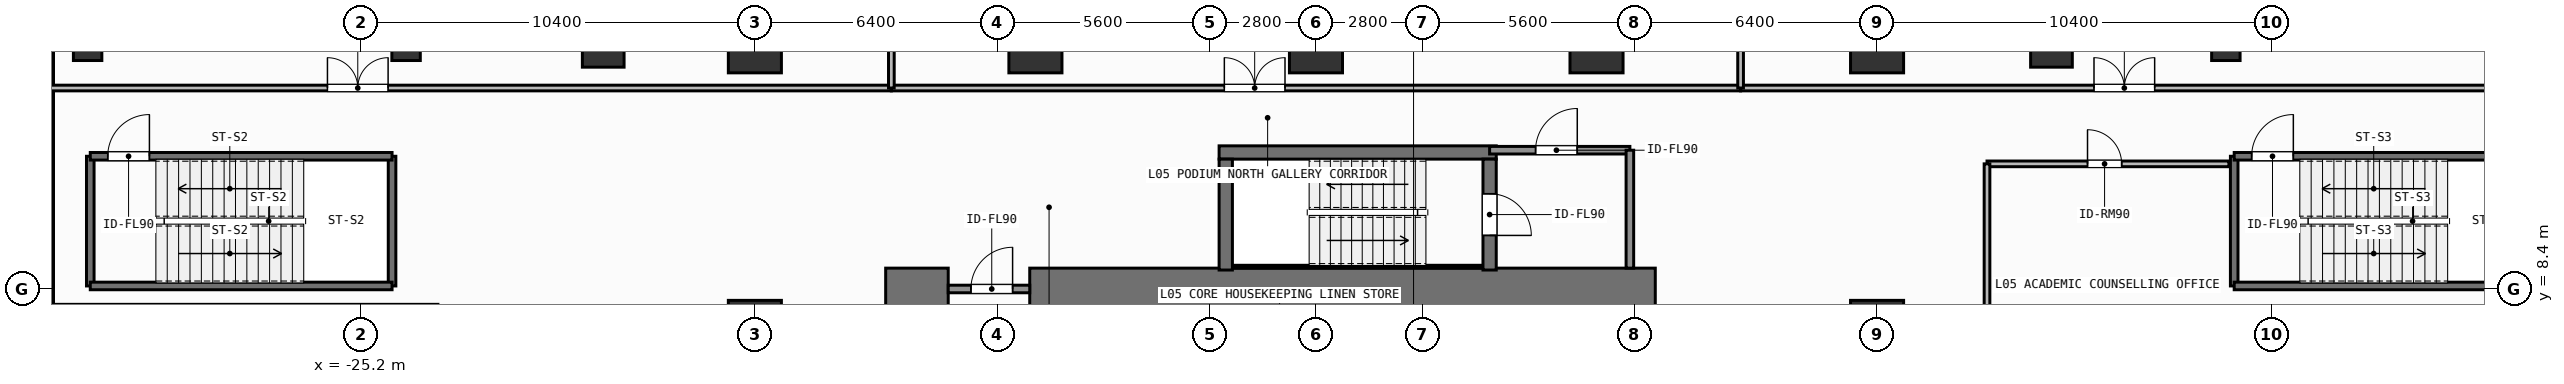
"""IFC4 building model, lengths in metres.
Left out: names, types, materials, properties, quantities, classifications, styles, units other than length and angle.
Written with IfcOpenShell. Run it as: python <this file> out.ifc"""

import sys

from ifc_helpers import new_model, si_unit, direction, frame, frame_2d, origin, origin_2d, place, context, subcontext, project, spatial, rectangle, extrude, element, fill, save


model = new_model("IFC4")
c1 = context("Model", 3, precision=1e-05, world=origin(), true_north=direction((0.0, 1.0)))
c2 = subcontext(c1, "Body", "Model", "MODEL_VIEW")
j1 = project(units=[si_unit("LENGTHUNIT", "METRE"), si_unit("PLANEANGLEUNIT", "RADIAN")], contexts=[c1])
p1 = place(None, origin())
s1 = spatial("IfcSite", under=j1, at=p1, CompositionType="ELEMENT")
p2 = place(p1, origin())
s2 = spatial("IfcBuilding", under=s1, at=p2, CompositionType="ELEMENT")
p3 = place(p2, frame((0.0, 0.0, 17.4)))
s3 = spatial("IfcBuildingStorey", under=s2, at=p3, CompositionType="ELEMENT", Elevation=17.4)
p4 = place(p3, frame((-11.35, 8.4, 0.0), z_axis=(0.0, 0.0, 1.0), x_axis=(1.0, 0.0, 0.0)))
e1 = element("IfcWall", 1, at=p4, inside=s3, PredefinedType="SHEAR", context=c2, shape_type="SweptSolid", body=[
    extrude(rectangle(XDim=1.65, YDim=1.1, at=frame_2d((0.825, 0.0))), origin(), (0.0, 0.0, 1.0), 4.2),
])
p5 = place(p3, frame((-7.55, 8.4, 0.0), z_axis=(0.0, 0.0, 1.0), x_axis=(1.0, 0.0, 0.0)))
e2 = element("IfcWall", 2, at=p5, inside=s3, PredefinedType="SHEAR", context=c2, shape_type="SweptSolid", body=[
    extrude(rectangle(XDim=16.5, YDim=1.1, at=frame_2d((8.25, 0.0))), origin(), (0.0, 0.0, 1.0), 4.2),
])
p6 = place(p3, frame((-2.555, 12.0, 0.0), z_axis=(0.0, 0.0, 1.0), x_axis=(1.0, 0.0, 0.0)))
e3 = element("IfcWall", 3, at=p6, inside=s3, PredefinedType="SHEAR", context=c2, shape_type="SweptSolid", body=[
    extrude(rectangle(XDim=7.31, YDim=0.35, at=frame_2d((3.655, 0.0))), origin(), (0.0, 0.0, 1.0), 4.2),
])
p7 = place(p3, frame((-2.2, 8.988, 0.0), z_axis=(0.0, 0.0, 1.0), x_axis=(1.0, 0.0, 0.0)))
e4 = element("IfcWall", 4, at=p7, inside=s3, PredefinedType="SHEAR", context=c2, shape_type="SweptSolid", body=[
    extrude(rectangle(XDim=6.6, YDim=0.075, at=frame_2d((3.3, 0.0))), origin(), (0.0, 0.0, 1.0), 4.2),
])
p8 = place(p3, frame((-2.38, 8.9, 0.0), z_axis=(0.0, 0.0, 1.0), x_axis=(0.0, 1.0, 0.0)))
e5 = element("IfcWall", 5, at=p8, inside=s3, PredefinedType="SHEAR", context=c2, shape_type="SweptSolid", body=[
    extrude(rectangle(XDim=2.925, YDim=0.35, at=frame_2d((1.462, 0.0))), origin(), (0.0, 0.0, 1.0), 4.2),
])
p9 = place(p3, frame((4.58, 11.825, 0.0), z_axis=(0.0, 0.0, 1.0), x_axis=(0.0, -1.0, 0.0)))
e6 = element("IfcWall", 6, at=p9, inside=s3, PredefinedType="SHEAR", context=c2, shape_type="SweptSolid", body=[
    extrude(rectangle(XDim=2.925, YDim=0.35, at=frame_2d((1.462, 0.0))), origin(), (0.0, 0.0, 1.0), 4.2),
])
p10 = place(p9, frame((0.913, 0.0, 0.0)))
e7 = element("IfcOpeningElement", 7, at=p10, cuts=e6, PredefinedType="OPENING", context=c2, shape_type="SweptSolid", body=[
    extrude(rectangle(XDim=1.1, YDim=2.15, at=frame_2d((0.55, 1.075))), frame((0.0, 0.185, 0.0), z_axis=(0.0, -1.0, 0.0), x_axis=(1.0, 0.0, 0.0)), (0.0, 0.0, 1.0), 0.37),
])
for number, where, z_axis, x_axis in (
    (8, (-14.8, 14.8, 0.0), (0.0, 0.0, 1.0), (1.0, 0.0, 0.0)),
    (9, (-7.4, 14.8, 0.0), (0.0, 0.0, 1.0), (1.0, 0.0, 0.0)),
    (10, (0.0, 14.8, 0.0), (0.0, 0.0, 1.0), (1.0, 0.0, 0.0)),
    (11, (7.4, 14.8, 0.0), (0.0, 0.0, 1.0), (1.0, 0.0, 0.0)),
    (12, (14.8, 14.8, 0.0), (0.0, 0.0, 1.0), (1.0, 0.0, 0.0)),
    (13, (-14.8, 7.4, 0.0), (0.0, 0.0, 1.0), (1.0, 0.0, 0.0)),
    (14, (14.8, 7.4, 0.0), (0.0, 0.0, 1.0), (1.0, 0.0, 0.0)),
):
    element("IfcColumn", number, at=place(p3, frame(where, z_axis=z_axis, x_axis=x_axis)), inside=s3, PredefinedType="COLUMN", context=c2, shape_type="SweptSolid", body=[
        extrude(rectangle(XDim=1.4, YDim=1.4, at=origin_2d()), origin(), (0.0, 0.0, 1.0), 4.2),
    ])
for number, where, z_axis, x_axis in (
    (15, (-18.8, 14.8, 0.0), (0.0, 0.0, 1.0), (1.0, 0.0, 0.0)),
    (16, (19.4, 14.8, 0.0), (0.0, 0.0, 1.0), (1.0, 0.0, 0.0)),
):
    element("IfcColumn", number, at=place(p3, frame(where, z_axis=z_axis, x_axis=x_axis)), inside=s3, PredefinedType="COLUMN", context=c2, shape_type="SweptSolid", body=[
        extrude(rectangle(XDim=1.1, YDim=1.1, at=origin_2d()), origin(), (0.0, 0.0, 1.0), 4.2),
    ])
for number, where, z_axis, x_axis in (
    (17, (-32.4, 14.8, 0.0), (0.0, 0.0, 1.0), (1.0, 0.0, 0.0)),
    (18, (-24.0, 14.8, 0.0), (0.0, 0.0, 1.0), (1.0, 0.0, 0.0)),
    (19, (24.0, 14.8, 0.0), (0.0, 0.0, 1.0), (1.0, 0.0, 0.0)),
):
    element("IfcColumn", number, at=place(p3, frame(where, z_axis=z_axis, x_axis=x_axis)), inside=s3, PredefinedType="COLUMN", context=c2, shape_type="SweptSolid", body=[
        extrude(rectangle(XDim=0.75, YDim=0.75, at=origin_2d()), origin(), (0.0, 0.0, 1.0), 4.2),
    ])
p11 = place(p3, frame((-33.45, 6.41, 0.0), z_axis=(0.0, 0.0, 1.0), x_axis=(0.0, 1.0, 0.0)))
e20 = element("IfcWall", 20, at=p11, inside=s3, PredefinedType="SOLIDWALL", context=c2, shape_type="SweptSolid", body=[
    extrude(rectangle(XDim=14.09, YDim=0.3, at=frame_2d((7.045, 0.0))), origin(), (0.0, 0.0, 1.0), 3.96),
])
for number, where, z_axis, x_axis in (
    (21, (-32.33, 8.48, 0.0), (0.0, 0.0, 1.0), (0.0, 1.0, 0.0)),
    (22, (-24.37, 11.9, 0.0), (0.0, 0.0, 1.0), (0.0, -1.0, 0.0)),
):
    element("IfcWall", number, at=place(p3, frame(where, z_axis=z_axis, x_axis=x_axis)), inside=s3, PredefinedType="SHEAR", context=c2, shape_type="SweptSolid", body=[
        extrude(rectangle(XDim=3.42, YDim=0.2, at=frame_2d((1.71, 0.0))), origin(), (0.0, 0.0, 1.0), 3.96),
    ])
p12 = place(p3, frame((-24.37, 8.48, 0.0), z_axis=(0.0, 0.0, 1.0), x_axis=(-1.0, 0.0, 0.0)))
e23 = element("IfcWall", 23, at=p12, inside=s3, PredefinedType="SHEAR", context=c2, shape_type="SweptSolid", body=[
    extrude(rectangle(XDim=7.96, YDim=0.2, at=frame_2d((3.98, 0.0))), origin(), (0.0, 0.0, 1.0), 3.96),
])
p13 = place(p3, frame((-32.33, 11.9, 0.0), z_axis=(0.0, 0.0, 1.0), x_axis=(1.0, 0.0, 0.0)))
e24 = element("IfcWall", 24, at=p13, inside=s3, PredefinedType="SHEAR", context=c2, shape_type="SweptSolid", body=[
    extrude(rectangle(XDim=7.96, YDim=0.2, at=frame_2d((3.98, 0.0))), origin(), (0.0, 0.0, 1.0), 3.96),
])
p14 = place(p13, frame((0.46, 0.0, 0.0)))
e25 = element("IfcOpeningElement", 25, at=p14, cuts=e24, PredefinedType="OPENING", context=c2, shape_type="SweptSolid", body=[
    extrude(rectangle(XDim=1.1, YDim=2.15, at=frame_2d((0.55, 1.075))), frame((0.0, 0.11, 0.0), z_axis=(0.0, -1.0, 0.0), x_axis=(1.0, 0.0, 0.0)), (0.0, 0.0, 1.0), 0.22),
])
p15 = place(p3, frame((24.22, 8.48, 0.0), z_axis=(0.0, 0.0, 1.0), x_axis=(0.0, 1.0, 0.0)))
e26 = element("IfcWall", 26, at=p15, inside=s3, PredefinedType="SHEAR", context=c2, shape_type="SweptSolid", body=[
    extrude(rectangle(XDim=3.42, YDim=0.2, at=frame_2d((1.71, 0.0))), origin(), (0.0, 0.0, 1.0), 3.96),
])
p16 = place(p3, frame((32.18, 8.48, 0.0), z_axis=(0.0, 0.0, 1.0), x_axis=(-1.0, 0.0, 0.0)))
e27 = element("IfcWall", 27, at=p16, inside=s3, PredefinedType="SHEAR", context=c2, shape_type="SweptSolid", body=[
    extrude(rectangle(XDim=7.96, YDim=0.2, at=frame_2d((3.98, 0.0))), origin(), (0.0, 0.0, 1.0), 3.96),
])
p17 = place(p3, frame((24.22, 11.9, 0.0), z_axis=(0.0, 0.0, 1.0), x_axis=(1.0, 0.0, 0.0)))
e28 = element("IfcWall", 28, at=p17, inside=s3, PredefinedType="SHEAR", context=c2, shape_type="SweptSolid", body=[
    extrude(rectangle(XDim=7.96, YDim=0.2, at=frame_2d((3.98, 0.0))), origin(), (0.0, 0.0, 1.0), 3.96),
])
p18 = place(p17, frame((0.46, 0.0, 0.0)))
e29 = element("IfcOpeningElement", 29, at=p18, cuts=e28, PredefinedType="OPENING", context=c2, shape_type="SweptSolid", body=[
    extrude(rectangle(XDim=1.1, YDim=2.15, at=frame_2d((0.55, 1.075))), frame((0.0, 0.11, 0.0), z_axis=(0.0, -1.0, 0.0), x_axis=(1.0, 0.0, 0.0)), (0.0, 0.0, 1.0), 0.22),
])
p19 = place(p3, frame((4.58, 12.06, 0.0), z_axis=(0.0, 0.0, 1.0), x_axis=(1.0, 0.0, 0.0)))
e30 = element("IfcWall", 30, at=p19, inside=s3, PredefinedType="SOLIDWALL", context=c2, shape_type="SweptSolid", body=[
    extrude(rectangle(XDim=3.7, YDim=0.2, at=frame_2d((1.85, 0.0))), origin(), (0.0, 0.0, 1.0), 3.96),
])
p20 = place(p19, frame((1.212, 0.0, 0.0)))
e31 = element("IfcOpeningElement", 31, at=p20, cuts=e30, PredefinedType="OPENING", context=c2, shape_type="SweptSolid", body=[
    extrude(rectangle(XDim=1.1, YDim=2.15, at=frame_2d((0.55, 1.075))), frame((0.0, 0.11, 0.0), z_axis=(0.0, -1.0, 0.0), x_axis=(1.0, 0.0, 0.0)), (0.0, 0.0, 1.0), 0.22),
])
p21 = place(p3, frame((-9.7, 8.4, 0.0), z_axis=(0.0, 0.0, 1.0), x_axis=(1.0, 0.0, 0.0)))
e32 = element("IfcWall", 32, at=p21, inside=s3, PredefinedType="SOLIDWALL", context=c2, shape_type="SweptSolid", body=[
    extrude(rectangle(XDim=2.15, YDim=0.2, at=frame_2d((1.075, 0.0))), origin(), (0.0, 0.0, 1.0), 3.0),
])
p22 = place(p21, frame((0.598, 0.0, 0.0)))
e33 = element("IfcOpeningElement", 33, at=p22, cuts=e32, PredefinedType="OPENING", context=c2, shape_type="SweptSolid", body=[
    extrude(rectangle(XDim=1.1, YDim=2.15, at=frame_2d((0.55, 1.075))), frame((0.0, 0.11, 0.0), z_axis=(0.0, -1.0, 0.0), x_axis=(1.0, 0.0, 0.0)), (0.0, 0.0, 1.0), 0.22),
])
p23 = place(p3, frame((-33.42, 13.7, 0.0), z_axis=(0.0, 0.0, 1.0), x_axis=(1.0, 0.0, 0.0)))
e34 = element("IfcWall", 34, at=p23, inside=s3, PredefinedType="PARTITIONING", context=c2, shape_type="SweptSolid", body=[
    extrude(rectangle(XDim=22.22, YDim=0.15, at=frame_2d((11.11, 0.0))), origin(), (0.0, 0.0, 1.0), 3.96),
])
p24 = place(p23, frame((7.346, 0.0, 0.0)))
e35 = element("IfcOpeningElement", 35, at=p24, cuts=e34, PredefinedType="OPENING", context=c2, shape_type="SweptSolid", body=[
    extrude(rectangle(XDim=1.6, YDim=2.3, at=frame_2d((0.8, 1.15))), frame((0.0, 0.085, 0.0), z_axis=(0.0, -1.0, 0.0), x_axis=(1.0, 0.0, 0.0)), (0.0, 0.0, 1.0), 0.17),
])
p25 = place(p3, frame((-11.2, 13.7, 0.0), z_axis=(0.0, 0.0, 1.0), x_axis=(1.0, 0.0, 0.0)))
e36 = element("IfcWall", 36, at=p25, inside=s3, PredefinedType="PARTITIONING", context=c2, shape_type="SweptSolid", body=[
    extrude(rectangle(XDim=22.4, YDim=0.15, at=frame_2d((11.2, 0.0))), origin(), (0.0, 0.0, 1.0), 3.96),
])
p26 = place(p25, frame((8.783, 0.0, 0.0)))
e37 = element("IfcOpeningElement", 37, at=p26, cuts=e36, PredefinedType="OPENING", context=c2, shape_type="SweptSolid", body=[
    extrude(rectangle(XDim=1.6, YDim=2.3, at=frame_2d((0.8, 1.15))), frame((0.0, 0.085, 0.0), z_axis=(0.0, -1.0, 0.0), x_axis=(1.0, 0.0, 0.0)), (0.0, 0.0, 1.0), 0.17),
])
p27 = place(p3, frame((11.2, 13.7, 0.0), z_axis=(0.0, 0.0, 1.0), x_axis=(1.0, 0.0, 0.0)))
e38 = element("IfcWall", 38, at=p27, inside=s3, PredefinedType="PARTITIONING", context=c2, shape_type="SweptSolid", body=[
    extrude(rectangle(XDim=22.22, YDim=0.15, at=frame_2d((11.11, 0.0))), origin(), (0.0, 0.0, 1.0), 3.96),
])
p28 = place(p27, frame((9.322, 0.0, 0.0)))
e39 = element("IfcOpeningElement", 39, at=p28, cuts=e38, PredefinedType="OPENING", context=c2, shape_type="SweptSolid", body=[
    extrude(rectangle(XDim=1.6, YDim=2.3, at=frame_2d((0.8, 1.15))), frame((0.0, 0.085, 0.0), z_axis=(0.0, -1.0, 0.0), x_axis=(1.0, 0.0, 0.0)), (0.0, 0.0, 1.0), 0.17),
])
p29 = place(p3, frame((17.7, 11.7, 0.0), z_axis=(0.0, 0.0, 1.0), x_axis=(1.0, 0.0, 0.0)))
e40 = element("IfcWall", 40, at=p29, inside=s3, PredefinedType="PARTITIONING", context=c2, shape_type="SweptSolid", body=[
    extrude(rectangle(XDim=6.38, YDim=0.15, at=frame_2d((3.19, 0.0))), origin(), (0.0, 0.0, 1.0), 3.96),
])
p30 = place(p29, frame((2.651, 0.0, 0.0)))
e41 = element("IfcOpeningElement", 41, at=p30, cuts=e40, PredefinedType="OPENING", context=c2, shape_type="SweptSolid", body=[
    extrude(rectangle(XDim=0.9, YDim=2.1, at=frame_2d((0.45, 1.05))), frame((0.0, 0.085, 0.0), z_axis=(0.0, -1.0, 0.0), x_axis=(1.0, 0.0, 0.0)), (0.0, 0.0, 1.0), 0.17),
])
p31 = place(p3, frame((8.28, 8.95, 0.0), z_axis=(0.0, 0.0, 1.0), x_axis=(0.0, 1.0, 0.0)))
e42 = element("IfcWall", 42, at=p31, inside=s3, PredefinedType="SOLIDWALL", context=c2, shape_type="SweptSolid", body=[
    extrude(rectangle(XDim=3.11, YDim=0.2, at=frame_2d((1.555, 0.0))), origin(), (0.0, 0.0, 1.0), 3.96),
])
for number, where, z_axis, x_axis in (
    (43, (-11.2, 13.7, 0.0), (0.0, 0.0, 1.0), (0.0, 1.0, 0.0)),
    (44, (11.2, 13.7, 0.0), (0.0, 0.0, 1.0), (0.0, 1.0, 0.0)),
):
    element("IfcWall", number, at=place(p3, frame(where, z_axis=z_axis, x_axis=x_axis)), inside=s3, PredefinedType="PARTITIONING", context=c2, shape_type="SweptSolid", body=[
        extrude(rectangle(XDim=11.22, YDim=0.15, at=frame_2d((5.61, 0.0))), origin(), (0.0, 0.0, 1.0), 3.96),
    ])
p32 = place(p3, frame((-33.42, 7.92, 0.0), z_axis=(0.0, 0.0, 1.0), x_axis=(1.0, 0.0, 0.0)))
e45 = element("IfcWall", 45, at=p32, inside=s3, PredefinedType="PARTITIONING", context=c2, shape_type="SweptSolid", body=[
    extrude(rectangle(XDim=10.26, YDim=0.15, at=frame_2d((5.13, 0.0))), origin(), (0.0, 0.0, 1.0), 3.96),
])
p33 = place(p3, frame((17.7, 5.28, 0.0), z_axis=(0.0, 0.0, 1.0), x_axis=(0.0, 1.0, 0.0)))
e46 = element("IfcWall", 46, at=p33, inside=s3, PredefinedType="PARTITIONING", context=c2, shape_type="SweptSolid", body=[
    extrude(rectangle(XDim=6.42, YDim=0.15, at=frame_2d((3.21, 0.0))), origin(), (0.0, 0.0, 1.0), 3.96),
])
p34 = place(p10, origin())
e47 = element("IfcDoor", 47, at=p34, inside=s3, OperationType="SINGLE_SWING_RIGHT", PredefinedType="DOOR", context=c2, shape_type="SweptSolid", body=[
    extrude(rectangle(XDim=1.1, YDim=2.15, at=frame_2d((0.55, 1.075))), frame((0.0, 0.025, 0.0), z_axis=(0.0, -1.0, 0.0), x_axis=(1.0, 0.0, 0.0)), (0.0, 0.0, 1.0), 0.05),
])
fill(e7, e47)
p35 = place(p14, origin())
e48 = element("IfcDoor", 48, at=p35, inside=s3, OperationType="SINGLE_SWING_RIGHT", PredefinedType="DOOR", context=c2, shape_type="SweptSolid", body=[
    extrude(rectangle(XDim=1.1, YDim=2.15, at=frame_2d((0.55, 1.075))), frame((0.0, 0.025, 0.0), z_axis=(0.0, -1.0, 0.0), x_axis=(1.0, 0.0, 0.0)), (0.0, 0.0, 1.0), 0.05),
])
fill(e25, e48)
p36 = place(p18, origin())
e49 = element("IfcDoor", 49, at=p36, inside=s3, OperationType="SINGLE_SWING_RIGHT", PredefinedType="DOOR", context=c2, shape_type="SweptSolid", body=[
    extrude(rectangle(XDim=1.1, YDim=2.15, at=frame_2d((0.55, 1.075))), frame((0.0, 0.025, 0.0), z_axis=(0.0, -1.0, 0.0), x_axis=(1.0, 0.0, 0.0)), (0.0, 0.0, 1.0), 0.05),
])
fill(e29, e49)
p37 = place(p20, origin())
e50 = element("IfcDoor", 50, at=p37, inside=s3, OperationType="SINGLE_SWING_RIGHT", PredefinedType="DOOR", context=c2, shape_type="SweptSolid", body=[
    extrude(rectangle(XDim=1.1, YDim=2.15, at=frame_2d((0.55, 1.075))), frame((0.0, 0.025, 0.0), z_axis=(0.0, -1.0, 0.0), x_axis=(1.0, 0.0, 0.0)), (0.0, 0.0, 1.0), 0.05),
])
fill(e31, e50)
p38 = place(p22, origin())
e51 = element("IfcDoor", 51, at=p38, inside=s3, OperationType="SINGLE_SWING_RIGHT", PredefinedType="DOOR", context=c2, shape_type="SweptSolid", body=[
    extrude(rectangle(XDim=1.1, YDim=2.15, at=frame_2d((0.55, 1.075))), frame((0.0, 0.025, 0.0), z_axis=(0.0, -1.0, 0.0), x_axis=(1.0, 0.0, 0.0)), (0.0, 0.0, 1.0), 0.05),
])
fill(e33, e51)
p39 = place(p24, origin())
e52 = element("IfcDoor", 52, at=p39, inside=s3, OperationType="SINGLE_SWING_LEFT", PredefinedType="DOOR", context=c2, shape_type="SweptSolid", body=[
    extrude(rectangle(XDim=1.6, YDim=2.3, at=frame_2d((0.8, 1.15))), frame((0.0, 0.025, 0.0), z_axis=(0.0, -1.0, 0.0), x_axis=(1.0, 0.0, 0.0)), (0.0, 0.0, 1.0), 0.05),
])
fill(e35, e52)
p40 = place(p26, origin())
e53 = element("IfcDoor", 53, at=p40, inside=s3, OperationType="SINGLE_SWING_LEFT", PredefinedType="DOOR", context=c2, shape_type="SweptSolid", body=[
    extrude(rectangle(XDim=1.6, YDim=2.3, at=frame_2d((0.8, 1.15))), frame((0.0, 0.025, 0.0), z_axis=(0.0, -1.0, 0.0), x_axis=(1.0, 0.0, 0.0)), (0.0, 0.0, 1.0), 0.05),
])
fill(e37, e53)
p41 = place(p28, origin())
e54 = element("IfcDoor", 54, at=p41, inside=s3, OperationType="SINGLE_SWING_LEFT", PredefinedType="DOOR", context=c2, shape_type="SweptSolid", body=[
    extrude(rectangle(XDim=1.6, YDim=2.3, at=frame_2d((0.8, 1.15))), frame((0.0, 0.025, 0.0), z_axis=(0.0, -1.0, 0.0), x_axis=(1.0, 0.0, 0.0)), (0.0, 0.0, 1.0), 0.05),
])
fill(e39, e54)
p42 = place(p30, origin())
e55 = element("IfcDoor", 55, at=p42, inside=s3, OperationType="SINGLE_SWING_LEFT", PredefinedType="DOOR", context=c2, shape_type="SweptSolid", body=[
    extrude(rectangle(XDim=0.9, YDim=2.1, at=frame_2d((0.45, 1.05))), frame((0.0, 0.025, 0.0), z_axis=(0.0, -1.0, 0.0), x_axis=(1.0, 0.0, 0.0)), (0.0, 0.0, 1.0), 0.05),
])
fill(e41, e55)
save(model, sys.argv[1])
